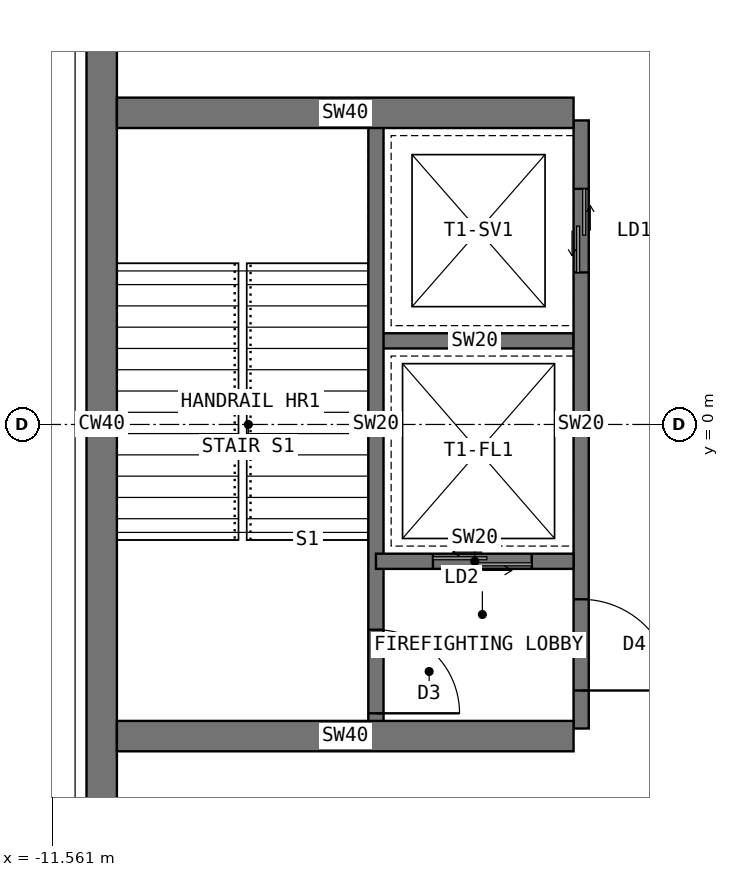
"""IFC4 building model, lengths in metres.
Left out: names, types, materials, properties, quantities, classifications, styles, units other than length and angle.
Written with IfcOpenShell. Run it as: python <this file> out.ifc"""

import sys

from ifc_helpers import new_model, si_unit, direction, frame, frame_2d, origin, place, context, subcontext, project, spatial, rectangle, extrude, element, fill, save


model = new_model("IFC4")
c1 = context("Model", 3, precision=1e-05, world=origin(), true_north=direction((0.0, 1.0)))
c2 = subcontext(c1, "Body", "Model", "MODEL_VIEW")
j1 = project(units=[si_unit("LENGTHUNIT", "METRE"), si_unit("PLANEANGLEUNIT", "RADIAN")], contexts=[c1])
p1 = place(None, origin())
s1 = spatial("IfcSite", under=j1, at=p1, CompositionType="ELEMENT")
p2 = place(p1, origin())
s2 = spatial("IfcBuilding", under=s1, at=p2, CompositionType="ELEMENT")
p3 = place(p2, frame((0.0, 0.0, 291.5)))
s3 = spatial("IfcBuildingStorey", under=s2, at=p3, CompositionType="ELEMENT", Elevation=291.5)
p4 = place(p3, frame((-10.908, 6.298, 0.0), z_axis=(0.0, 0.0, 1.0), x_axis=(0.0, -1.0, 0.0)))
e1 = element("IfcWall", 1, at=p4, inside=s3, PredefinedType="SHEAR", context=c2, shape_type="SweptSolid", body=[
    extrude(rectangle(XDim=12.596, YDim=0.4, at=frame_2d((6.298, 0.0))), origin(), (0.0, 0.0, 1.0), 4.55),
])
p5 = place(p3, frame((-4.6, 4.0, 0.0), z_axis=(0.0, 0.0, 1.0), x_axis=(0.0, -1.0, 0.0)))
e2 = element("IfcWall", 2, at=p5, inside=s3, PredefinedType="SHEAR", context=c2, shape_type="SweptSolid", body=[
    extrude(rectangle(XDim=8.0, YDim=0.2, at=frame_2d((4.0, 0.0))), origin(), (0.0, 0.0, 1.0), 4.55),
])
p6 = place(p5, frame((6.3, 0.0, 0.0)))
e3 = element("IfcOpeningElement", 3, at=p6, cuts=e2, PredefinedType="OPENING", context=c2, shape_type="SweptSolid", body=[
    extrude(rectangle(XDim=1.2, YDim=2.1, at=frame_2d((0.6, 1.05))), frame((0.0, 0.11, 0.0), z_axis=(0.0, -1.0, 0.0), x_axis=(1.0, 0.0, 0.0)), (0.0, 0.0, 1.0), 0.22),
])
p7 = place(p5, frame((0.9, 0.0, 0.0)))
e4 = element("IfcOpeningElement", 4, at=p7, cuts=e2, PredefinedType="OPENING", context=c2, shape_type="SweptSolid", body=[
    extrude(rectangle(XDim=1.1, YDim=2.2, at=frame_2d((0.55, 1.1))), frame((0.0, 0.11, 0.0), z_axis=(0.0, -1.0, 0.0), x_axis=(1.0, 0.0, 0.0)), (0.0, 0.0, 1.0), 0.22),
])
p8 = place(p3, frame((-4.7, 1.1, 0.0), z_axis=(0.0, 0.0, 1.0), x_axis=(-1.0, 0.0, 0.0)))
e5 = element("IfcWall", 5, at=p8, inside=s3, PredefinedType="SHEAR", context=c2, shape_type="SweptSolid", body=[
    extrude(rectangle(XDim=2.6, YDim=0.2, at=frame_2d((1.3, 0.0))), origin(), (0.0, 0.0, 1.0), 4.55),
])
p9 = place(p3, frame((-4.7, -1.8, 0.0), z_axis=(0.0, 0.0, 1.0), x_axis=(-1.0, 0.0, 0.0)))
e6 = element("IfcWall", 6, at=p9, inside=s3, PredefinedType="SHEAR", context=c2, shape_type="SweptSolid", body=[
    extrude(rectangle(XDim=2.6, YDim=0.2, at=frame_2d((1.3, 0.0))), origin(), (0.0, 0.0, 1.0), 4.55),
])
p10 = place(p9, frame((0.55, 0.0, 0.0)))
e7 = element("IfcOpeningElement", 7, at=p10, cuts=e6, PredefinedType="OPENING", context=c2, shape_type="SweptSolid", body=[
    extrude(rectangle(XDim=1.3, YDim=2.2, at=frame_2d((0.65, 1.1))), frame((0.0, 0.11, 0.0), z_axis=(0.0, -1.0, 0.0), x_axis=(1.0, 0.0, 0.0)), (0.0, 0.0, 1.0), 0.22),
])
p11 = place(p3, frame((-7.3, 4.0, 0.0), z_axis=(0.0, 0.0, 1.0), x_axis=(0.0, -1.0, 0.0)))
e8 = element("IfcWall", 8, at=p11, inside=s3, PredefinedType="SHEAR", context=c2, shape_type="SweptSolid", body=[
    extrude(rectangle(XDim=8.0, YDim=0.2, at=frame_2d((4.0, 0.0))), origin(), (0.0, 0.0, 1.0), 4.55),
])
p12 = place(p11, frame((6.7, 0.0, 0.0)))
e9 = element("IfcOpeningElement", 9, at=p12, cuts=e8, PredefinedType="OPENING", context=c2, shape_type="SweptSolid", body=[
    extrude(rectangle(XDim=1.1, YDim=2.1, at=frame_2d((0.55, 1.05))), frame((0.0, 0.11, 0.0), z_axis=(0.0, -1.0, 0.0), x_axis=(1.0, 0.0, 0.0)), (0.0, 0.0, 1.0), 0.22),
])
for number, where, z_axis, x_axis in (
    (10, (-4.7, -4.1, 0.0), (0.0, 0.0, 1.0), (-1.0, 0.0, 0.0)),
    (11, (-4.7, 4.1, 0.0), (0.0, 0.0, 1.0), (-1.0, 0.0, 0.0)),
):
    element("IfcWall", number, at=place(p3, frame(where, z_axis=z_axis, x_axis=x_axis)), inside=s3, PredefinedType="SHEAR", context=c2, shape_type="SweptSolid", body=[
        extrude(rectangle(XDim=6.008, YDim=0.4, at=frame_2d((3.004, 0.0))), origin(), (0.0, 0.0, 1.0), 4.55),
    ])
p13 = place(p6, origin())
e12 = element("IfcDoor", 12, at=p13, inside=s3, OperationType="SINGLE_SWING_RIGHT", PredefinedType="DOOR", context=c2, shape_type="SweptSolid", body=[
    extrude(rectangle(XDim=1.2, YDim=2.1, at=frame_2d((0.6, 1.05))), frame((0.0, 0.025, 0.0), z_axis=(0.0, -1.0, 0.0), x_axis=(1.0, 0.0, 0.0)), (0.0, 0.0, 1.0), 0.05),
])
fill(e3, e12)
p14 = place(p10, origin())
e13 = element("IfcDoor", 13, at=p14, inside=s3, OperationType="DOUBLE_DOOR_SLIDING", PredefinedType="DOOR", context=c2, shape_type="SweptSolid", body=[
    extrude(rectangle(XDim=1.3, YDim=2.2, at=frame_2d((0.65, 1.1))), frame((0.0, 0.025, 0.0), z_axis=(0.0, -1.0, 0.0), x_axis=(1.0, 0.0, 0.0)), (0.0, 0.0, 1.0), 0.05),
])
fill(e7, e13)
p15 = place(p7, origin())
e14 = element("IfcDoor", 14, at=p15, inside=s3, OperationType="DOUBLE_DOOR_SLIDING", PredefinedType="DOOR", context=c2, shape_type="SweptSolid", body=[
    extrude(rectangle(XDim=1.1, YDim=2.2, at=frame_2d((0.55, 1.1))), frame((0.0, 0.025, 0.0), z_axis=(0.0, -1.0, 0.0), x_axis=(1.0, 0.0, 0.0)), (0.0, 0.0, 1.0), 0.05),
])
fill(e4, e14)
p16 = place(p12, origin())
e15 = element("IfcDoor", 15, at=p16, inside=s3, OperationType="SINGLE_SWING_RIGHT", PredefinedType="DOOR", context=c2, shape_type="SweptSolid", body=[
    extrude(rectangle(XDim=1.1, YDim=2.1, at=frame_2d((0.55, 1.05))), frame((0.0, 0.025, 0.0), z_axis=(0.0, -1.0, 0.0), x_axis=(1.0, 0.0, 0.0)), (0.0, 0.0, 1.0), 0.05),
])
fill(e9, e15)
save(model, sys.argv[1])
